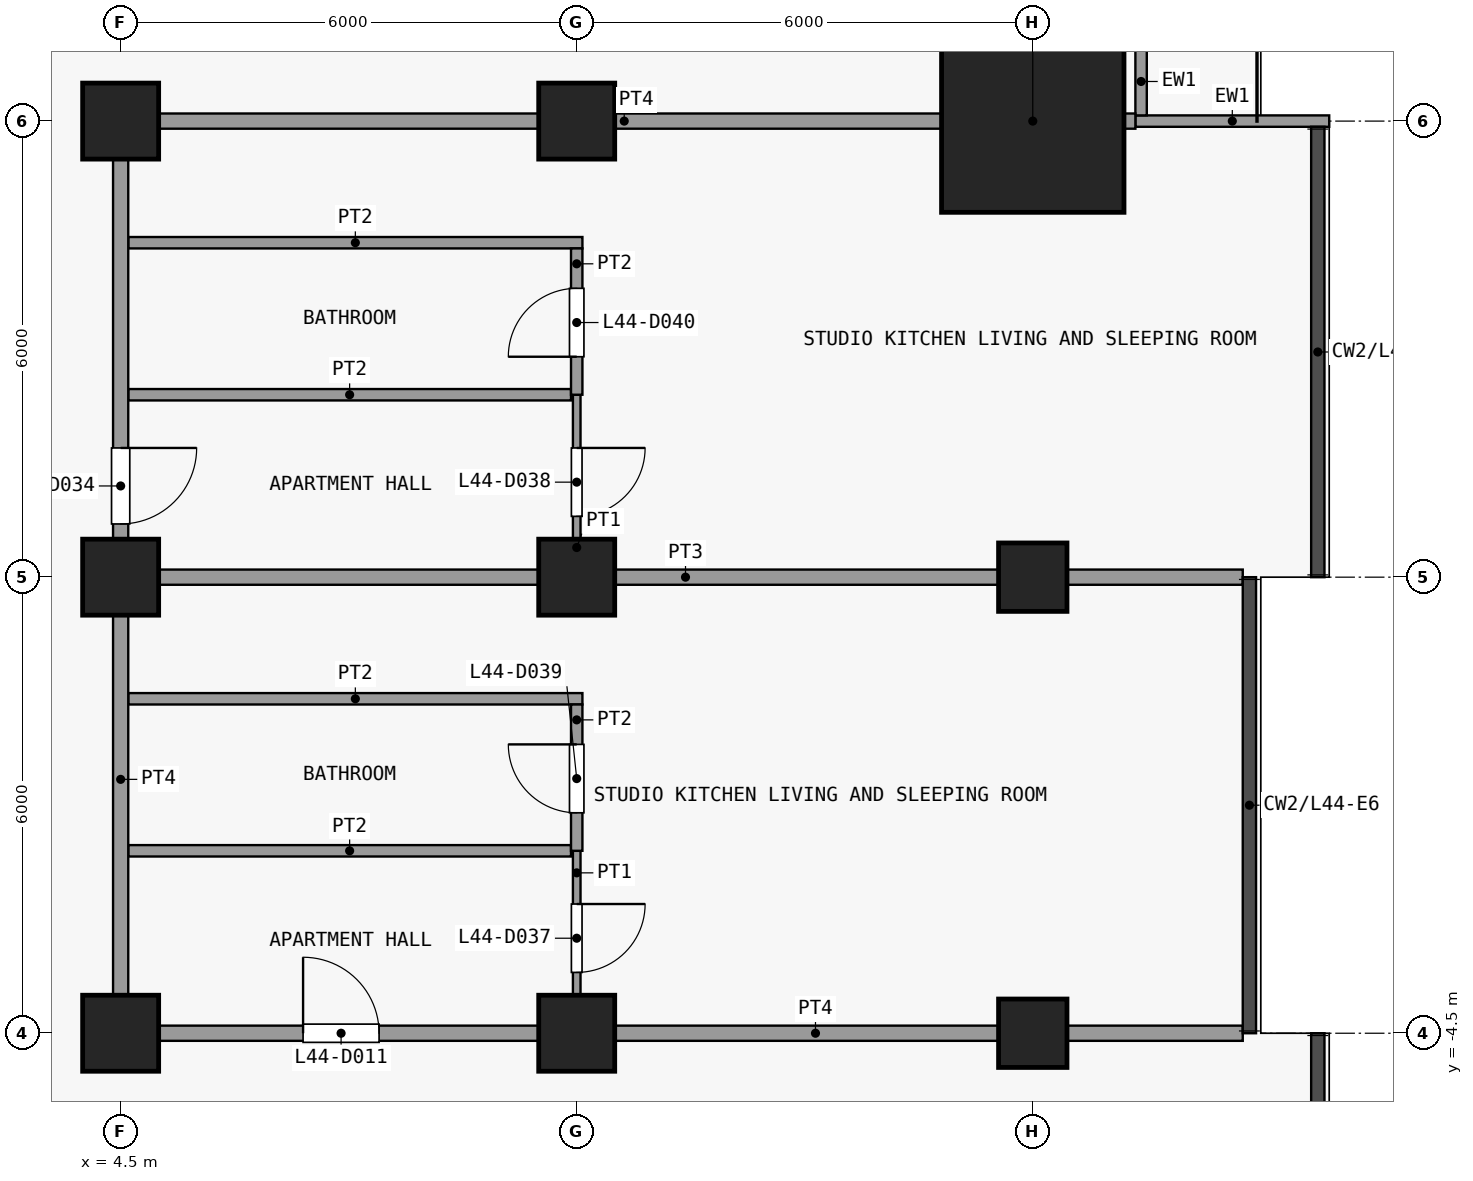
"""IFC4 building model, lengths in metres.
Left out: names, types, materials, properties, quantities, classifications, styles, units other than length and angle.
Written with IfcOpenShell. Run it as: python <this file> out.ifc"""

import sys

from ifc_helpers import new_model, si_unit, direction, frame, frame_2d, origin, origin_2d, place, context, subcontext, project, spatial, rectangle, extrude, element, fill, save


model = new_model("IFC4")
c1 = context("Model", 3, precision=1e-05, world=origin(), true_north=direction((0.0, 1.0)))
c2 = subcontext(c1, "Body", "Model", "MODEL_VIEW")
j1 = project(units=[si_unit("LENGTHUNIT", "METRE"), si_unit("PLANEANGLEUNIT", "RADIAN")], contexts=[c1])
p1 = place(None, origin())
s1 = spatial("IfcSite", under=j1, at=p1, CompositionType="ELEMENT")
p2 = place(p1, origin())
s2 = spatial("IfcBuilding", under=s1, at=p2, CompositionType="ELEMENT")
p3 = place(p2, frame((0.0, 0.0, 178.1)))
s3 = spatial("IfcBuildingStorey", under=s2, at=p3, CompositionType="ELEMENT", Elevation=178.1)
for number, where, z_axis, x_axis in (
    (1, (4.5, -4.5, 0.0), (0.0, 0.0, 1.0), (1.0, 0.0, 0.0)),
    (2, (4.5, 1.5, 0.0), (0.0, 0.0, 1.0), (1.0, 0.0, 0.0)),
    (3, (4.5, 7.5, 0.0), (0.0, 0.0, 1.0), (1.0, 0.0, 0.0)),
    (4, (10.5, -4.5, 0.0), (0.0, 0.0, 1.0), (1.0, 0.0, 0.0)),
    (5, (10.5, 1.5, 0.0), (0.0, 0.0, 1.0), (1.0, 0.0, 0.0)),
    (6, (10.5, 7.5, 0.0), (0.0, 0.0, 1.0), (1.0, 0.0, 0.0)),
):
    element("IfcColumn", number, at=place(p3, frame(where, z_axis=z_axis, x_axis=x_axis)), inside=s3, PredefinedType="COLUMN", context=c2, shape_type="SweptSolid", body=[
        extrude(rectangle(XDim=1.0, YDim=1.0, at=origin_2d()), origin(), (0.0, 0.0, 1.0), 3.6),
    ])
for number, where, z_axis, x_axis in (
    (7, (16.5, -4.5, 0.0), (0.0, 0.0, 1.0), (1.0, 0.0, 0.0)),
    (8, (16.5, 1.5, 0.0), (0.0, 0.0, 1.0), (1.0, 0.0, 0.0)),
):
    element("IfcColumn", number, at=place(p3, frame(where, z_axis=z_axis, x_axis=x_axis)), inside=s3, PredefinedType="COLUMN", context=c2, shape_type="SweptSolid", body=[
        extrude(rectangle(XDim=0.9, YDim=0.9, at=origin_2d()), origin(), (0.0, 0.0, 1.0), 3.6),
    ])
p4 = place(p3, frame((16.5, 7.5, 0.0), z_axis=(0.0, 0.0, 1.0), x_axis=(1.0, 0.0, 0.0)))
e9 = element("IfcColumn", 9, at=p4, inside=s3, PredefinedType="COLUMN", context=c2, shape_type="SweptSolid", body=[
    extrude(rectangle(XDim=2.4, YDim=2.4, at=origin_2d()), origin(), (0.0, 0.0, 1.0), 3.6),
])
p5 = place(p3, frame((17.85, 7.5, 0.0), z_axis=(0.0, 0.0, 1.0), x_axis=(1.0, 0.0, 0.0)))
e10 = element("IfcWall", 10, at=p5, inside=s3, PredefinedType="SOLIDWALL", context=c2, shape_type="SweptSolid", body=[
    extrude(rectangle(XDim=2.55, YDim=0.15, at=frame_2d((1.275, 0.0))), origin(), (0.0, 0.0, 1.0), 3.3),
])
p6 = place(p3, frame((17.925, 13.425, 0.0), z_axis=(0.0, 0.0, 1.0), x_axis=(0.0, -1.0, 0.0)))
e11 = element("IfcWall", 11, at=p6, inside=s3, PredefinedType="SOLIDWALL", context=c2, shape_type="SweptSolid", body=[
    extrude(rectangle(XDim=5.85, YDim=0.15, at=frame_2d((2.925, 0.0))), origin(), (0.0, 0.0, 1.0), 3.3),
])
p7 = place(p6, frame((0.825, 0.0, 0.0)))
e12 = element("IfcOpeningElement", 12, at=p7, cuts=e11, PredefinedType="OPENING", context=c2, shape_type="SweptSolid", body=[
    extrude(rectangle(XDim=1.2, YDim=2.4, at=frame_2d((0.6, 1.2))), frame((0.0, 0.085, 0.0), z_axis=(0.0, -1.0, 0.0), x_axis=(1.0, 0.0, 0.0)), (0.0, 0.0, 1.0), 0.17),
])
p8 = place(p6, frame((3.038, 0.0, 0.9)))
e13 = element("IfcOpeningElement", 13, at=p8, cuts=e11, PredefinedType="OPENING", context=c2, shape_type="SweptSolid", body=[
    extrude(rectangle(XDim=1.8, YDim=2.1, at=frame_2d((0.9, 1.05))), frame((0.0, 0.085, 0.0), z_axis=(0.0, -1.0, 0.0), x_axis=(1.0, 0.0, 0.0)), (0.0, 0.0, 1.0), 0.17),
])
p9 = place(p3, frame((4.4, -4.5, 0.0), z_axis=(0.0, 0.0, 1.0), x_axis=(1.0, 0.0, 0.0)))
e14 = element("IfcWall", 14, at=p9, inside=s3, PredefinedType="PARTITIONING", context=c2, shape_type="SweptSolid", body=[
    extrude(rectangle(XDim=14.863, YDim=0.2, at=frame_2d((7.431, 0.0))), origin(), (0.0, 0.0, 1.0), 3.3),
])
p10 = place(p9, frame((2.5, 0.0, 0.0)))
e15 = element("IfcOpeningElement", 15, at=p10, cuts=e14, PredefinedType="OPENING", context=c2, shape_type="SweptSolid", body=[
    extrude(rectangle(XDim=1.0, YDim=2.1, at=frame_2d((0.5, 1.05))), frame((0.0, 0.11, 0.0), z_axis=(0.0, -1.0, 0.0), x_axis=(1.0, 0.0, 0.0)), (0.0, 0.0, 1.0), 0.22),
])
p11 = place(p3, frame((4.6, -2.1, 0.0), z_axis=(0.0, 0.0, 1.0), x_axis=(1.0, 0.0, 0.0)))
e16 = element("IfcWall", 16, at=p11, inside=s3, PredefinedType="PARTITIONING", context=c2, shape_type="SweptSolid", body=[
    extrude(rectangle(XDim=5.825, YDim=0.15, at=frame_2d((2.913, 0.0))), origin(), (0.0, 0.0, 1.0), 3.3),
])
p12 = place(p3, frame((4.6, -0.1, 0.0), z_axis=(0.0, 0.0, 1.0), x_axis=(1.0, 0.0, 0.0)))
e17 = element("IfcWall", 17, at=p12, inside=s3, PredefinedType="PARTITIONING", context=c2, shape_type="SweptSolid", body=[
    extrude(rectangle(XDim=5.975, YDim=0.15, at=frame_2d((2.987, 0.0))), origin(), (0.0, 0.0, 1.0), 3.3),
])
p13 = place(p3, frame((4.6, 1.5, 0.0), z_axis=(0.0, 0.0, 1.0), x_axis=(1.0, 0.0, 0.0)))
e18 = element("IfcWall", 18, at=p13, inside=s3, PredefinedType="PARTITIONING", context=c2, shape_type="SweptSolid", body=[
    extrude(rectangle(XDim=14.662, YDim=0.2, at=frame_2d((7.331, 0.0))), origin(), (0.0, 0.0, 1.0), 3.3),
])
p14 = place(p3, frame((4.6, 3.9, 0.0), z_axis=(0.0, 0.0, 1.0), x_axis=(1.0, 0.0, 0.0)))
e19 = element("IfcWall", 19, at=p14, inside=s3, PredefinedType="PARTITIONING", context=c2, shape_type="SweptSolid", body=[
    extrude(rectangle(XDim=5.825, YDim=0.15, at=frame_2d((2.913, 0.0))), origin(), (0.0, 0.0, 1.0), 3.3),
])
p15 = place(p3, frame((4.6, 5.9, 0.0), z_axis=(0.0, 0.0, 1.0), x_axis=(1.0, 0.0, 0.0)))
e20 = element("IfcWall", 20, at=p15, inside=s3, PredefinedType="PARTITIONING", context=c2, shape_type="SweptSolid", body=[
    extrude(rectangle(XDim=5.975, YDim=0.15, at=frame_2d((2.987, 0.0))), origin(), (0.0, 0.0, 1.0), 3.3),
])
p16 = place(p3, frame((4.4, 7.5, 0.0), z_axis=(0.0, 0.0, 1.0), x_axis=(1.0, 0.0, 0.0)))
e21 = element("IfcWall", 21, at=p16, inside=s3, PredefinedType="PARTITIONING", context=c2, shape_type="SweptSolid", body=[
    extrude(rectangle(XDim=13.45, YDim=0.2, at=frame_2d((6.725, 0.0))), origin(), (0.0, 0.0, 1.0), 3.3),
])
p17 = place(p3, frame((4.5, -4.4, 0.0), z_axis=(0.0, 0.0, 1.0), x_axis=(0.0, 1.0, 0.0)))
e22 = element("IfcWall", 22, at=p17, inside=s3, PredefinedType="PARTITIONING", context=c2, shape_type="SweptSolid", body=[
    extrude(rectangle(XDim=11.8, YDim=0.2, at=frame_2d((5.9, 0.0))), origin(), (0.0, 0.0, 1.0), 3.3),
])
p18 = place(p17, frame((6.6, 0.0, 0.0)))
e23 = element("IfcOpeningElement", 23, at=p18, cuts=e22, PredefinedType="OPENING", context=c2, shape_type="SweptSolid", body=[
    extrude(rectangle(XDim=1.0, YDim=2.1, at=frame_2d((0.5, 1.05))), frame((0.0, 0.11, 0.0), z_axis=(0.0, -1.0, 0.0), x_axis=(1.0, 0.0, 0.0)), (0.0, 0.0, 1.0), 0.22),
])
p19 = place(p3, frame((10.5, -4.4, 0.0), z_axis=(0.0, 0.0, 1.0), x_axis=(0.0, 1.0, 0.0)))
e24 = element("IfcWall", 24, at=p19, inside=s3, PredefinedType="PARTITIONING", context=c2, shape_type="SweptSolid", body=[
    extrude(rectangle(XDim=2.3, YDim=0.1, at=frame_2d((1.15, 0.0))), origin(), (0.0, 0.0, 1.0), 3.3),
])
p20 = place(p19, frame((0.7, 0.0, 0.0)))
e25 = element("IfcOpeningElement", 25, at=p20, cuts=e24, PredefinedType="OPENING", context=c2, shape_type="SweptSolid", body=[
    extrude(rectangle(XDim=0.9, YDim=2.1, at=frame_2d((0.45, 1.05))), frame((0.0, 0.06, 0.0), z_axis=(0.0, -1.0, 0.0), x_axis=(1.0, 0.0, 0.0)), (0.0, 0.0, 1.0), 0.12),
])
p21 = place(p3, frame((10.5, 1.6, 0.0), z_axis=(0.0, 0.0, 1.0), x_axis=(0.0, 1.0, 0.0)))
e26 = element("IfcWall", 26, at=p21, inside=s3, PredefinedType="PARTITIONING", context=c2, shape_type="SweptSolid", body=[
    extrude(rectangle(XDim=2.3, YDim=0.1, at=frame_2d((1.15, 0.0))), origin(), (0.0, 0.0, 1.0), 3.3),
])
p22 = place(p21, frame((0.7, 0.0, 0.0)))
e27 = element("IfcOpeningElement", 27, at=p22, cuts=e26, PredefinedType="OPENING", context=c2, shape_type="SweptSolid", body=[
    extrude(rectangle(XDim=0.9, YDim=2.1, at=frame_2d((0.45, 1.05))), frame((0.0, 0.06, 0.0), z_axis=(0.0, -1.0, 0.0), x_axis=(1.0, 0.0, 0.0)), (0.0, 0.0, 1.0), 0.12),
])
p23 = place(p3, frame((10.5, -2.1, 0.0), z_axis=(0.0, 0.0, 1.0), x_axis=(0.0, 1.0, 0.0)))
e28 = element("IfcWall", 28, at=p23, inside=s3, PredefinedType="PARTITIONING", context=c2, shape_type="SweptSolid", body=[
    extrude(rectangle(XDim=1.925, YDim=0.15, at=frame_2d((0.962, 0.0))), origin(), (0.0, 0.0, 1.0), 3.3),
])
p24 = place(p23, frame((0.5, 0.0, 0.0)))
e29 = element("IfcOpeningElement", 29, at=p24, cuts=e28, PredefinedType="OPENING", context=c2, shape_type="SweptSolid", body=[
    extrude(rectangle(XDim=0.9, YDim=2.1, at=frame_2d((0.45, 1.05))), frame((0.0, 0.085, 0.0), z_axis=(0.0, -1.0, 0.0), x_axis=(1.0, 0.0, 0.0)), (0.0, 0.0, 1.0), 0.17),
])
p25 = place(p3, frame((10.5, 3.9, 0.0), z_axis=(0.0, 0.0, 1.0), x_axis=(0.0, 1.0, 0.0)))
e30 = element("IfcWall", 30, at=p25, inside=s3, PredefinedType="PARTITIONING", context=c2, shape_type="SweptSolid", body=[
    extrude(rectangle(XDim=1.925, YDim=0.15, at=frame_2d((0.962, 0.0))), origin(), (0.0, 0.0, 1.0), 3.3),
])
p26 = place(p25, frame((0.5, 0.0, 0.0)))
e31 = element("IfcOpeningElement", 31, at=p26, cuts=e30, PredefinedType="OPENING", context=c2, shape_type="SweptSolid", body=[
    extrude(rectangle(XDim=0.9, YDim=2.1, at=frame_2d((0.45, 1.05))), frame((0.0, 0.085, 0.0), z_axis=(0.0, -1.0, 0.0), x_axis=(1.0, 0.0, 0.0)), (0.0, 0.0, 1.0), 0.17),
])
p27 = place(p10, origin())
e32 = element("IfcDoor", 32, at=p27, inside=s3, OperationType="SINGLE_SWING_RIGHT", PredefinedType="DOOR", context=c2, shape_type="SweptSolid", body=[
    extrude(rectangle(XDim=1.0, YDim=2.1, at=frame_2d((0.5, 1.05))), frame((0.0, 0.025, 0.0), z_axis=(0.0, -1.0, 0.0), x_axis=(1.0, 0.0, 0.0)), (0.0, 0.0, 1.0), 0.05),
])
fill(e15, e32)
p28 = place(p18, origin())
e33 = element("IfcDoor", 33, at=p28, inside=s3, OperationType="SINGLE_SWING_RIGHT", PredefinedType="DOOR", context=c2, shape_type="SweptSolid", body=[
    extrude(rectangle(XDim=1.0, YDim=2.1, at=frame_2d((0.5, 1.05))), frame((0.0, 0.025, 0.0), z_axis=(0.0, -1.0, 0.0), x_axis=(1.0, 0.0, 0.0)), (0.0, 0.0, 1.0), 0.05),
])
fill(e23, e33)
p29 = place(p20, origin())
e34 = element("IfcDoor", 34, at=p29, inside=s3, OperationType="SINGLE_SWING_RIGHT", PredefinedType="DOOR", context=c2, shape_type="SweptSolid", body=[
    extrude(rectangle(XDim=0.9, YDim=2.1, at=frame_2d((0.45, 1.05))), frame((0.0, 0.025, 0.0), z_axis=(0.0, -1.0, 0.0), x_axis=(1.0, 0.0, 0.0)), (0.0, 0.0, 1.0), 0.05),
])
fill(e25, e34)
p30 = place(p22, origin())
e35 = element("IfcDoor", 35, at=p30, inside=s3, OperationType="SINGLE_SWING_RIGHT", PredefinedType="DOOR", context=c2, shape_type="SweptSolid", body=[
    extrude(rectangle(XDim=0.9, YDim=2.1, at=frame_2d((0.45, 1.05))), frame((0.0, 0.025, 0.0), z_axis=(0.0, -1.0, 0.0), x_axis=(1.0, 0.0, 0.0)), (0.0, 0.0, 1.0), 0.05),
])
fill(e27, e35)
p31 = place(p24, origin())
e36 = element("IfcDoor", 36, at=p31, inside=s3, OperationType="SINGLE_SWING_LEFT", PredefinedType="DOOR", context=c2, shape_type="SweptSolid", body=[
    extrude(rectangle(XDim=0.9, YDim=2.1, at=frame_2d((0.45, 1.05))), frame((0.0, 0.025, 0.0), z_axis=(0.0, -1.0, 0.0), x_axis=(1.0, 0.0, 0.0)), (0.0, 0.0, 1.0), 0.05),
])
fill(e29, e36)
p32 = place(p26, origin())
e37 = element("IfcDoor", 37, at=p32, inside=s3, OperationType="SINGLE_SWING_RIGHT", PredefinedType="DOOR", context=c2, shape_type="SweptSolid", body=[
    extrude(rectangle(XDim=0.9, YDim=2.1, at=frame_2d((0.45, 1.05))), frame((0.0, 0.025, 0.0), z_axis=(0.0, -1.0, 0.0), x_axis=(1.0, 0.0, 0.0)), (0.0, 0.0, 1.0), 0.05),
])
fill(e31, e37)
save(model, sys.argv[1])
